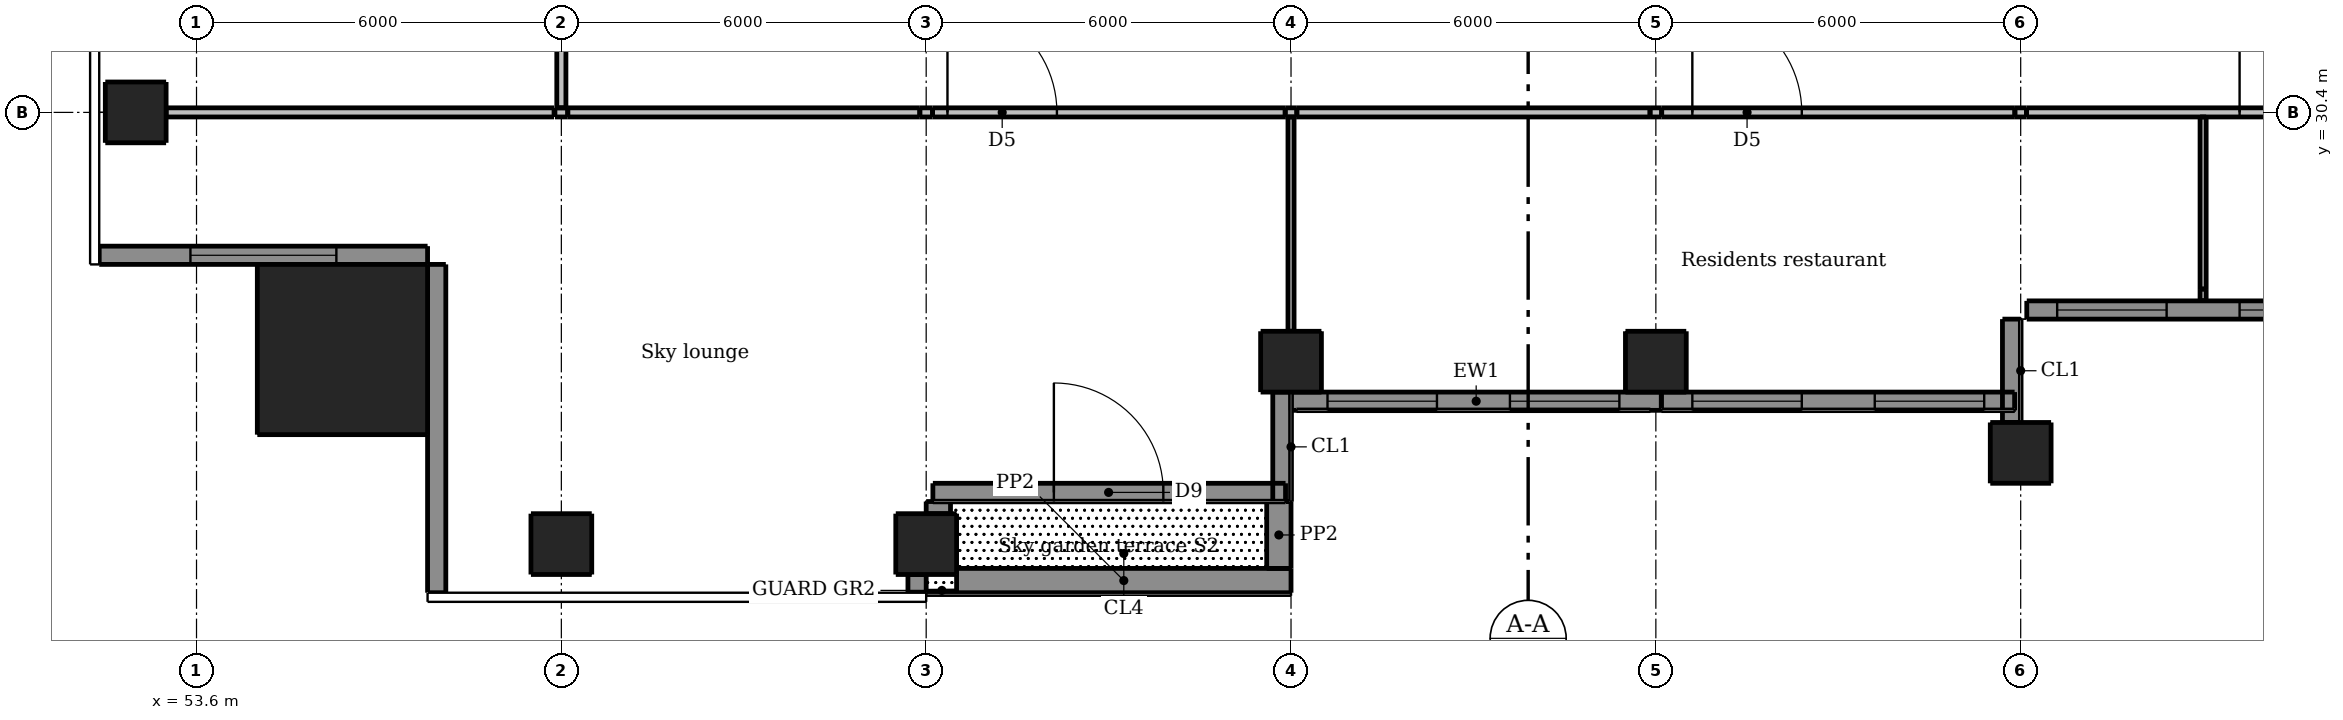
"""IFC4 building model, lengths in metres.
Left out: names, types, materials, properties, quantities, classifications, styles, units other than length and angle.
Written with IfcOpenShell. Run it as: python <this file> out.ifc"""

import sys

from ifc_helpers import new_model, si_unit, direction, frame, frame_2d, origin, origin_2d, place, context, subcontext, project, spatial, rectangle, extrude, element, fill, save


model = new_model("IFC4")
c1 = context("Model", 3, precision=1e-05, world=origin(), true_north=direction((0.0, 1.0)))
c2 = subcontext(c1, "Body", "Model", "MODEL_VIEW")
j1 = project(units=[si_unit("LENGTHUNIT", "METRE"), si_unit("PLANEANGLEUNIT", "RADIAN")], contexts=[c1])
p1 = place(None, origin())
s1 = spatial("IfcSite", under=j1, at=p1, CompositionType="ELEMENT")
p2 = place(p1, origin())
s2 = spatial("IfcBuilding", under=s1, at=p2, CompositionType="ELEMENT")
p3 = place(p2, frame((0.0, 0.0, 150.4)))
s3 = spatial("IfcBuildingStorey", under=s2, at=p3, CompositionType="ELEMENT", Elevation=150.4)
for number, where, z_axis, x_axis in (
    (1, (59.6, 23.3, 0.0), (0.0, 0.0, 1.0), (1.0, 0.0, 0.0)),
    (2, (65.6, 23.3, 0.0), (0.0, 0.0, 1.0), (1.0, 0.0, 0.0)),
    (3, (71.6, 26.3, 0.0), (0.0, 0.0, 1.0), (1.0, 0.0, 0.0)),
    (4, (77.6, 26.3, 0.0), (0.0, 0.0, 1.0), (1.0, 0.0, 0.0)),
    (5, (83.6, 24.8, 0.0), (0.0, 0.0, 1.0), (1.0, 0.0, 0.0)),
    (6, (52.6, 30.4, 0.0), (0.0, 0.0, 1.0), (1.0, 0.0, 0.0)),
):
    element("IfcColumn", number, at=place(p3, frame(where, z_axis=z_axis, x_axis=x_axis)), inside=s3, PredefinedType="COLUMN", context=c2, shape_type="SweptSolid", body=[
        extrude(rectangle(XDim=1.0, YDim=1.0, at=origin_2d()), origin(), (0.0, 0.0, 1.0), 4.25),
    ])
p4 = place(p3, frame((56.0, 26.5, 0.0), z_axis=(0.0, 0.0, 1.0), x_axis=(1.0, 0.0, 0.0)))
e7 = element("IfcColumn", 7, at=p4, inside=s3, PredefinedType="COLUMN", context=c2, shape_type="SweptSolid", body=[
    extrude(rectangle(XDim=2.8, YDim=2.8, at=origin_2d()), origin(), (0.0, 0.0, 1.0), 4.5),
])
p5 = place(p3, frame((65.45, 22.5, 0.0), z_axis=(0.0, 0.0, 1.0), x_axis=(0.0, 1.0, 0.0)))
e8 = element("IfcWall", 8, at=p5, inside=s3, PredefinedType="SOLIDWALL", context=c2, shape_type="SweptSolid", body=[
    extrude(rectangle(XDim=0.3, YDim=0.3, at=frame_2d((0.15, 0.0))), origin(), (0.0, 0.0, 1.0), 4.25),
])
p6 = place(p3, frame((52.0, 28.05, 0.0), z_axis=(0.0, 0.0, 1.0), x_axis=(1.0, 0.0, 0.0)))
e9 = element("IfcWall", 9, at=p6, inside=s3, PredefinedType="SOLIDWALL", context=c2, shape_type="SweptSolid", body=[
    extrude(rectangle(XDim=5.4, YDim=0.3, at=frame_2d((2.7, 0.0))), origin(), (0.0, 0.0, 1.0), 4.25),
])
p7 = place(p6, frame((1.5, 0.0, 0.15)))
e10 = element("IfcOpeningElement", 10, at=p7, cuts=e9, PredefinedType="OPENING", context=c2, shape_type="SweptSolid", body=[
    extrude(rectangle(XDim=2.4, YDim=2.1, at=frame_2d((1.2, 1.05))), frame((0.0, 0.16, 0.0), z_axis=(0.0, -1.0, 0.0), x_axis=(1.0, 0.0, 0.0)), (0.0, 0.0, 1.0), 0.32),
])
p8 = place(p3, frame((57.55, 27.9, 0.0), z_axis=(0.0, 0.0, 1.0), x_axis=(0.0, -1.0, 0.0)))
e11 = element("IfcWall", 11, at=p8, inside=s3, PredefinedType="SOLIDWALL", context=c2, shape_type="SweptSolid", body=[
    extrude(rectangle(XDim=5.4, YDim=0.3, at=frame_2d((2.7, 0.0))), origin(), (0.0, 0.0, 1.0), 4.25),
])
p9 = place(p3, frame((65.71, 24.15, 0.0), z_axis=(0.0, 0.0, 1.0), x_axis=(1.0, 0.0, 0.0)))
e12 = element("IfcWall", 12, at=p9, inside=s3, PredefinedType="SOLIDWALL", context=c2, shape_type="SweptSolid", body=[
    extrude(rectangle(XDim=5.8, YDim=0.3, at=frame_2d((2.9, 0.0))), origin(), (0.0, 0.0, 1.0), 4.25),
])
p10 = place(p9, frame((1.99, 0.0, 0.0)))
e13 = element("IfcOpeningElement", 13, at=p10, cuts=e12, PredefinedType="OPENING", context=c2, shape_type="SweptSolid", body=[
    extrude(rectangle(XDim=1.8, YDim=2.4, at=frame_2d((0.9, 1.2))), frame((0.0, 0.16, 0.0), z_axis=(0.0, -1.0, 0.0), x_axis=(1.0, 0.0, 0.0)), (0.0, 0.0, 1.0), 0.32),
])
p11 = place(p3, frame((71.45, 24.0, 0.0), z_axis=(0.0, 0.0, 1.0), x_axis=(0.0, 1.0, 0.0)))
e14 = element("IfcWall", 14, at=p11, inside=s3, PredefinedType="SOLIDWALL", context=c2, shape_type="SweptSolid", body=[
    extrude(rectangle(XDim=1.8, YDim=0.3, at=frame_2d((0.9, 0.0))), origin(), (0.0, 0.0, 1.0), 3.897),
])
p12 = place(p3, frame((71.6, 25.65, 0.0), z_axis=(0.0, 0.0, 1.0), x_axis=(1.0, 0.0, 0.0)))
e15 = element("IfcWall", 15, at=p12, inside=s3, PredefinedType="SOLIDWALL", context=c2, shape_type="SweptSolid", body=[
    extrude(rectangle(XDim=6.09, YDim=0.3, at=frame_2d((3.045, 0.0))), origin(), (0.0, 0.0, 1.0), 4.25),
])
p13 = place(p12, frame((0.6, 0.0, 0.15)))
e16 = element("IfcOpeningElement", 16, at=p13, cuts=e15, PredefinedType="OPENING", context=c2, shape_type="SweptSolid", body=[
    extrude(rectangle(XDim=1.8, YDim=2.1, at=frame_2d((0.9, 1.05))), frame((0.0, 0.16, 0.0), z_axis=(0.0, -1.0, 0.0), x_axis=(1.0, 0.0, 0.0)), (0.0, 0.0, 1.0), 0.32),
])
p14 = place(p12, frame((3.6, 0.0, 0.15)))
e17 = element("IfcOpeningElement", 17, at=p14, cuts=e15, PredefinedType="OPENING", context=c2, shape_type="SweptSolid", body=[
    extrude(rectangle(XDim=1.8, YDim=2.1, at=frame_2d((0.9, 1.05))), frame((0.0, 0.16, 0.0), z_axis=(0.0, -1.0, 0.0), x_axis=(1.0, 0.0, 0.0)), (0.0, 0.0, 1.0), 0.32),
])
p15 = place(p3, frame((77.69, 25.65, 0.0), z_axis=(0.0, 0.0, 1.0), x_axis=(1.0, 0.0, 0.0)))
e18 = element("IfcWall", 18, at=p15, inside=s3, PredefinedType="SOLIDWALL", context=c2, shape_type="SweptSolid", body=[
    extrude(rectangle(XDim=5.81, YDim=0.3, at=frame_2d((2.905, 0.0))), origin(), (0.0, 0.0, 1.0), 4.25),
])
p16 = place(p15, frame((0.51, 0.0, 0.15)))
e19 = element("IfcOpeningElement", 19, at=p16, cuts=e18, PredefinedType="OPENING", context=c2, shape_type="SweptSolid", body=[
    extrude(rectangle(XDim=1.8, YDim=2.1, at=frame_2d((0.9, 1.05))), frame((0.0, 0.16, 0.0), z_axis=(0.0, -1.0, 0.0), x_axis=(1.0, 0.0, 0.0)), (0.0, 0.0, 1.0), 0.32),
])
p17 = place(p15, frame((3.51, 0.0, 0.15)))
e20 = element("IfcOpeningElement", 20, at=p17, cuts=e18, PredefinedType="OPENING", context=c2, shape_type="SweptSolid", body=[
    extrude(rectangle(XDim=1.8, YDim=2.1, at=frame_2d((0.9, 1.05))), frame((0.0, 0.16, 0.0), z_axis=(0.0, -1.0, 0.0), x_axis=(1.0, 0.0, 0.0)), (0.0, 0.0, 1.0), 0.32),
])
p18 = place(p3, frame((83.45, 25.3, 0.0), z_axis=(0.0, 0.0, 1.0), x_axis=(0.0, 1.0, 0.0)))
e21 = element("IfcWall", 21, at=p18, inside=s3, PredefinedType="SOLIDWALL", context=c2, shape_type="SweptSolid", body=[
    extrude(rectangle(XDim=1.7, YDim=0.3, at=frame_2d((0.85, 0.0))), origin(), (0.0, 0.0, 1.0), 3.788),
])
p19 = place(p3, frame((83.7, 27.15, 0.0), z_axis=(0.0, 0.0, 1.0), x_axis=(1.0, 0.0, 0.0)))
e22 = element("IfcWall", 22, at=p19, inside=s3, PredefinedType="SOLIDWALL", context=c2, shape_type="SweptSolid", body=[
    extrude(rectangle(XDim=5.79, YDim=0.3, at=frame_2d((2.895, 0.0))), origin(), (0.0, 0.0, 1.0), 4.25),
])
p20 = place(p19, frame((0.5, 0.0, 0.15)))
e23 = element("IfcOpeningElement", 23, at=p20, cuts=e22, PredefinedType="OPENING", context=c2, shape_type="SweptSolid", body=[
    extrude(rectangle(XDim=1.8, YDim=2.1, at=frame_2d((0.9, 1.05))), frame((0.0, 0.16, 0.0), z_axis=(0.0, -1.0, 0.0), x_axis=(1.0, 0.0, 0.0)), (0.0, 0.0, 1.0), 0.32),
])
p21 = place(p19, frame((3.5, 0.0, 0.15)))
e24 = element("IfcOpeningElement", 24, at=p21, cuts=e22, PredefinedType="OPENING", context=c2, shape_type="SweptSolid", body=[
    extrude(rectangle(XDim=1.8, YDim=2.1, at=frame_2d((0.9, 1.05))), frame((0.0, 0.16, 0.0), z_axis=(0.0, -1.0, 0.0), x_axis=(1.0, 0.0, 0.0)), (0.0, 0.0, 1.0), 0.32),
])
p22 = place(p3, frame((66.1, 22.7, 0.03), z_axis=(0.0, 0.0, 1.0), x_axis=(1.0, 0.0, 0.0)))
e25 = element("IfcWall", 25, at=p22, inside=s3, PredefinedType="PARAPET", context=c2, shape_type="SweptSolid", body=[
    extrude(rectangle(XDim=5.5, YDim=0.4, at=frame_2d((2.75, 0.0))), origin(), (0.0, 0.0, 1.0), 1.1),
])
p23 = place(p3, frame((65.8, 23.8, 0.03), z_axis=(0.0, 0.0, 1.0), x_axis=(0.0, 1.0, 0.0)))
e26 = element("IfcWall", 26, at=p23, inside=s3, PredefinedType="PARAPET", context=c2, shape_type="SweptSolid", body=[
    extrude(rectangle(XDim=0.2, YDim=0.4, at=frame_2d((0.1, 0.0))), origin(), (0.0, 0.0, 1.0), 1.1),
])
p24 = place(p3, frame((71.4, 22.9, 0.03), z_axis=(0.0, 0.0, 1.0), x_axis=(0.0, 1.0, 0.0)))
e27 = element("IfcWall", 27, at=p24, inside=s3, PredefinedType="PARAPET", context=c2, shape_type="SweptSolid", body=[
    extrude(rectangle(XDim=1.1, YDim=0.4, at=frame_2d((0.55, 0.0))), origin(), (0.0, 0.0, 1.0), 1.1),
])
p25 = place(p3, frame((53.1, 30.4, 0.0), z_axis=(0.0, 0.0, 1.0), x_axis=(1.0, 0.0, 0.0)))
e28 = element("IfcWall", 28, at=p25, inside=s3, PredefinedType="PARTITIONING", context=c2, shape_type="SweptSolid", body=[
    extrude(rectangle(XDim=6.38, YDim=0.15, at=frame_2d((3.19, 0.0))), origin(), (0.0, 0.0, 1.0), 3.847),
])
p26 = place(p3, frame((59.495, 30.4, 0.0), z_axis=(0.0, 0.0, 1.0), x_axis=(1.0, 0.0, 0.0)))
e29 = element("IfcWall", 29, at=p26, inside=s3, PredefinedType="PARTITIONING", context=c2, shape_type="SweptSolid", body=[
    extrude(rectangle(XDim=0.211, YDim=0.15, at=frame_2d((0.105, 0.0))), origin(), (0.0, 0.0, 1.0), 3.711),
])
p27 = place(p3, frame((59.705, 30.4, 0.0), z_axis=(0.0, 0.0, 1.0), x_axis=(1.0, 0.0, 0.0)))
e30 = element("IfcWall", 30, at=p27, inside=s3, PredefinedType="PARTITIONING", context=c2, shape_type="SweptSolid", body=[
    extrude(rectangle(XDim=5.79, YDim=0.15, at=frame_2d((2.895, 0.0))), origin(), (0.0, 0.0, 1.0), 4.25),
])
p28 = place(p3, frame((65.495, 30.4, 0.0), z_axis=(0.0, 0.0, 1.0), x_axis=(1.0, 0.0, 0.0)))
e31 = element("IfcWall", 31, at=p28, inside=s3, PredefinedType="PARTITIONING", context=c2, shape_type="SweptSolid", body=[
    extrude(rectangle(XDim=0.209, YDim=0.15, at=frame_2d((0.104, 0.0))), origin(), (0.0, 0.0, 1.0), 3.717),
])
p29 = place(p3, frame((65.705, 30.4, 0.0), z_axis=(0.0, 0.0, 1.0), x_axis=(1.0, 0.0, 0.0)))
e32 = element("IfcWall", 32, at=p29, inside=s3, PredefinedType="PARTITIONING", context=c2, shape_type="SweptSolid", body=[
    extrude(rectangle(XDim=5.8, YDim=0.15, at=frame_2d((2.9, 0.0))), origin(), (0.0, 0.0, 1.0), 4.25),
])
p30 = place(p29, frame((0.245, 0.0, 0.0)))
e33 = element("IfcOpeningElement", 33, at=p30, cuts=e32, PredefinedType="OPENING", context=c2, shape_type="SweptSolid", body=[
    extrude(rectangle(XDim=1.8, YDim=2.1, at=frame_2d((0.9, 1.05))), frame((0.0, 0.085, 0.0), z_axis=(0.0, -1.0, 0.0), x_axis=(1.0, 0.0, 0.0)), (0.0, 0.0, 1.0), 0.17),
])
p31 = place(p3, frame((71.504, 30.4, 0.0), z_axis=(0.0, 0.0, 1.0), x_axis=(1.0, 0.0, 0.0)))
e34 = element("IfcWall", 34, at=p31, inside=s3, PredefinedType="PARTITIONING", context=c2, shape_type="SweptSolid", body=[
    extrude(rectangle(XDim=0.191, YDim=0.15, at=frame_2d((0.096, 0.0))), origin(), (0.0, 0.0, 1.0), 3.79),
])
p32 = place(p3, frame((71.696, 30.4, 0.0), z_axis=(0.0, 0.0, 1.0), x_axis=(1.0, 0.0, 0.0)))
e35 = element("IfcWall", 35, at=p32, inside=s3, PredefinedType="PARTITIONING", context=c2, shape_type="SweptSolid", body=[
    extrude(rectangle(XDim=5.809, YDim=0.15, at=frame_2d((2.904, 0.0))), origin(), (0.0, 0.0, 1.0), 4.25),
])
p33 = place(p3, frame((77.504, 30.4, 0.0), z_axis=(0.0, 0.0, 1.0), x_axis=(1.0, 0.0, 0.0)))
e36 = element("IfcWall", 36, at=p33, inside=s3, PredefinedType="PARTITIONING", context=c2, shape_type="SweptSolid", body=[
    extrude(rectangle(XDim=0.191, YDim=0.15, at=frame_2d((0.096, 0.0))), origin(), (0.0, 0.0, 1.0), 3.79),
])
p34 = place(p3, frame((77.696, 30.4, 0.0), z_axis=(0.0, 0.0, 1.0), x_axis=(1.0, 0.0, 0.0)))
e37 = element("IfcWall", 37, at=p34, inside=s3, PredefinedType="PARTITIONING", context=c2, shape_type="SweptSolid", body=[
    extrude(rectangle(XDim=5.809, YDim=0.15, at=frame_2d((2.904, 0.0))), origin(), (0.0, 0.0, 1.0), 4.25),
])
p35 = place(p34, frame((0.504, 0.0, 0.0)))
e38 = element("IfcOpeningElement", 38, at=p35, cuts=e37, PredefinedType="OPENING", context=c2, shape_type="SweptSolid", body=[
    extrude(rectangle(XDim=1.8, YDim=2.1, at=frame_2d((0.9, 1.05))), frame((0.0, 0.085, 0.0), z_axis=(0.0, -1.0, 0.0), x_axis=(1.0, 0.0, 0.0)), (0.0, 0.0, 1.0), 0.17),
])
p36 = place(p3, frame((83.504, 30.4, 0.0), z_axis=(0.0, 0.0, 1.0), x_axis=(1.0, 0.0, 0.0)))
e39 = element("IfcWall", 39, at=p36, inside=s3, PredefinedType="PARTITIONING", context=c2, shape_type="SweptSolid", body=[
    extrude(rectangle(XDim=0.191, YDim=0.15, at=frame_2d((0.096, 0.0))), origin(), (0.0, 0.0, 1.0), 3.79),
])
p37 = place(p3, frame((83.696, 30.4, 0.0), z_axis=(0.0, 0.0, 1.0), x_axis=(1.0, 0.0, 0.0)))
e40 = element("IfcWall", 40, at=p37, inside=s3, PredefinedType="PARTITIONING", context=c2, shape_type="SweptSolid", body=[
    extrude(rectangle(XDim=5.799, YDim=0.15, at=frame_2d((2.899, 0.0))), origin(), (0.0, 0.0, 1.0), 4.25),
])
p38 = place(p37, frame((3.504, 0.0, 0.0)))
e41 = element("IfcOpeningElement", 41, at=p38, cuts=e40, PredefinedType="OPENING", context=c2, shape_type="SweptSolid", body=[
    extrude(rectangle(XDim=1.8, YDim=2.1, at=frame_2d((0.9, 1.05))), frame((0.0, 0.085, 0.0), z_axis=(0.0, -1.0, 0.0), x_axis=(1.0, 0.0, 0.0)), (0.0, 0.0, 1.0), 0.17),
])
p39 = place(p3, frame((59.6, 30.475, 0.0), z_axis=(0.0, 0.0, 1.0), x_axis=(0.0, 1.0, 0.0)))
e42 = element("IfcWall", 42, at=p39, inside=s3, PredefinedType="PARTITIONING", context=c2, shape_type="SweptSolid", body=[
    extrude(rectangle(XDim=5.82, YDim=0.15, at=frame_2d((2.91, 0.0))), origin(), (0.0, 0.0, 1.0), 3.711),
])
p40 = place(p39, frame((2.025, 0.0, 0.0)))
e43 = element("IfcOpeningElement", 43, at=p40, cuts=e42, PredefinedType="OPENING", context=c2, shape_type="SweptSolid", body=[
    extrude(rectangle(XDim=1.8, YDim=2.1, at=frame_2d((0.9, 1.05))), frame((0.0, 0.085, 0.0), z_axis=(0.0, -1.0, 0.0), x_axis=(1.0, 0.0, 0.0)), (0.0, 0.0, 1.0), 0.17),
])
p41 = place(p3, frame((71.6, 25.8, 0.0), z_axis=(0.0, 0.0, 1.0), x_axis=(0.0, 1.0, 0.0)))
e44 = element("IfcWall", 44, at=p41, inside=s3, PredefinedType="PARTITIONING", context=c2, shape_type="SweptSolid", body=[
    extrude(rectangle(XDim=1.0, YDim=0.1, at=frame_2d((0.5, 0.0))), origin(), (0.0, 0.0, 1.0), 4.25),
])
p42 = place(p3, frame((71.6, 26.8, 0.0), z_axis=(0.0, 0.0, 1.0), x_axis=(0.0, 1.0, 0.0)))
e45 = element("IfcWall", 45, at=p42, inside=s3, PredefinedType="PARTITIONING", context=c2, shape_type="SweptSolid", body=[
    extrude(rectangle(XDim=3.525, YDim=0.1, at=frame_2d((1.762, 0.0))), origin(), (0.0, 0.0, 1.0), 3.79),
])
p43 = place(p3, frame((86.6, 27.305, 0.0), z_axis=(0.0, 0.0, 1.0), x_axis=(0.0, 1.0, 0.0)))
e46 = element("IfcWall", 46, at=p43, inside=s3, PredefinedType="PARTITIONING", context=c2, shape_type="SweptSolid", body=[
    extrude(rectangle(XDim=0.19, YDim=0.1, at=frame_2d((0.095, 0.0))), origin(), (0.0, 0.0, 1.0), 3.797),
])
p44 = place(p3, frame((86.6, 27.495, 0.0), z_axis=(0.0, 0.0, 1.0), x_axis=(0.0, 1.0, 0.0)))
e47 = element("IfcWall", 47, at=p44, inside=s3, PredefinedType="PARTITIONING", context=c2, shape_type="SweptSolid", body=[
    extrude(rectangle(XDim=2.83, YDim=0.1, at=frame_2d((1.415, 0.0))), origin(), (0.0, 0.0, 1.0), 4.25),
])
p45 = place(p7, origin())
e48 = element("IfcWindow", 48, at=p45, inside=s3, PartitioningType="DOUBLE_PANEL_VERTICAL", PredefinedType="WINDOW", context=c2, shape_type="SweptSolid", body=[
    extrude(rectangle(XDim=2.4, YDim=2.1, at=frame_2d((1.2, 1.05))), frame((0.0, 0.03, 0.0), z_axis=(0.0, -1.0, 0.0), x_axis=(1.0, 0.0, 0.0)), (0.0, 0.0, 1.0), 0.06),
])
fill(e10, e48)
p46 = place(p13, origin())
e49 = element("IfcWindow", 49, at=p46, inside=s3, PartitioningType="DOUBLE_PANEL_VERTICAL", PredefinedType="WINDOW", context=c2, shape_type="SweptSolid", body=[
    extrude(rectangle(XDim=1.8, YDim=2.1, at=frame_2d((0.9, 1.05))), frame((0.0, 0.03, 0.0), z_axis=(0.0, -1.0, 0.0), x_axis=(1.0, 0.0, 0.0)), (0.0, 0.0, 1.0), 0.06),
])
fill(e16, e49)
p47 = place(p14, origin())
e50 = element("IfcWindow", 50, at=p47, inside=s3, PartitioningType="DOUBLE_PANEL_VERTICAL", PredefinedType="WINDOW", context=c2, shape_type="SweptSolid", body=[
    extrude(rectangle(XDim=1.8, YDim=2.1, at=frame_2d((0.9, 1.05))), frame((0.0, 0.03, 0.0), z_axis=(0.0, -1.0, 0.0), x_axis=(1.0, 0.0, 0.0)), (0.0, 0.0, 1.0), 0.06),
])
fill(e17, e50)
p48 = place(p16, origin())
e51 = element("IfcWindow", 51, at=p48, inside=s3, PartitioningType="DOUBLE_PANEL_VERTICAL", PredefinedType="WINDOW", context=c2, shape_type="SweptSolid", body=[
    extrude(rectangle(XDim=1.8, YDim=2.1, at=frame_2d((0.9, 1.05))), frame((0.0, 0.03, 0.0), z_axis=(0.0, -1.0, 0.0), x_axis=(1.0, 0.0, 0.0)), (0.0, 0.0, 1.0), 0.06),
])
fill(e19, e51)
p49 = place(p17, origin())
e52 = element("IfcWindow", 52, at=p49, inside=s3, PartitioningType="DOUBLE_PANEL_VERTICAL", PredefinedType="WINDOW", context=c2, shape_type="SweptSolid", body=[
    extrude(rectangle(XDim=1.8, YDim=2.1, at=frame_2d((0.9, 1.05))), frame((0.0, 0.03, 0.0), z_axis=(0.0, -1.0, 0.0), x_axis=(1.0, 0.0, 0.0)), (0.0, 0.0, 1.0), 0.06),
])
fill(e20, e52)
p50 = place(p20, origin())
e53 = element("IfcWindow", 53, at=p50, inside=s3, PartitioningType="DOUBLE_PANEL_VERTICAL", PredefinedType="WINDOW", context=c2, shape_type="SweptSolid", body=[
    extrude(rectangle(XDim=1.8, YDim=2.1, at=frame_2d((0.9, 1.05))), frame((0.0, 0.03, 0.0), z_axis=(0.0, -1.0, 0.0), x_axis=(1.0, 0.0, 0.0)), (0.0, 0.0, 1.0), 0.06),
])
fill(e23, e53)
p51 = place(p21, origin())
e54 = element("IfcWindow", 54, at=p51, inside=s3, PartitioningType="DOUBLE_PANEL_VERTICAL", PredefinedType="WINDOW", context=c2, shape_type="SweptSolid", body=[
    extrude(rectangle(XDim=1.8, YDim=2.1, at=frame_2d((0.9, 1.05))), frame((0.0, 0.03, 0.0), z_axis=(0.0, -1.0, 0.0), x_axis=(1.0, 0.0, 0.0)), (0.0, 0.0, 1.0), 0.06),
])
fill(e24, e54)
p52 = place(p10, origin())
e55 = element("IfcDoor", 55, at=p52, inside=s3, OperationType="DOUBLE_DOOR_SINGLE_SWING", PredefinedType="DOOR", context=c2, shape_type="SweptSolid", body=[
    extrude(rectangle(XDim=1.8, YDim=2.4, at=frame_2d((0.9, 1.2))), frame((0.0, 0.025, 0.0), z_axis=(0.0, -1.0, 0.0), x_axis=(1.0, 0.0, 0.0)), (0.0, 0.0, 1.0), 0.05),
])
fill(e13, e55)
p53 = place(p30, origin())
e56 = element("IfcDoor", 56, at=p53, inside=s3, OperationType="DOUBLE_DOOR_SINGLE_SWING", PredefinedType="DOOR", context=c2, shape_type="SweptSolid", body=[
    extrude(rectangle(XDim=1.8, YDim=2.1, at=frame_2d((0.9, 1.05))), frame((0.0, 0.025, 0.0), z_axis=(0.0, -1.0, 0.0), x_axis=(1.0, 0.0, 0.0)), (0.0, 0.0, 1.0), 0.05),
])
fill(e33, e56)
p54 = place(p35, origin())
e57 = element("IfcDoor", 57, at=p54, inside=s3, OperationType="DOUBLE_DOOR_SINGLE_SWING", PredefinedType="DOOR", context=c2, shape_type="SweptSolid", body=[
    extrude(rectangle(XDim=1.8, YDim=2.1, at=frame_2d((0.9, 1.05))), frame((0.0, 0.025, 0.0), z_axis=(0.0, -1.0, 0.0), x_axis=(1.0, 0.0, 0.0)), (0.0, 0.0, 1.0), 0.05),
])
fill(e38, e57)
p55 = place(p38, origin())
e58 = element("IfcDoor", 58, at=p55, inside=s3, OperationType="DOUBLE_DOOR_SINGLE_SWING", PredefinedType="DOOR", context=c2, shape_type="SweptSolid", body=[
    extrude(rectangle(XDim=1.8, YDim=2.1, at=frame_2d((0.9, 1.05))), frame((0.0, 0.025, 0.0), z_axis=(0.0, -1.0, 0.0), x_axis=(1.0, 0.0, 0.0)), (0.0, 0.0, 1.0), 0.05),
])
fill(e41, e58)
save(model, sys.argv[1])
